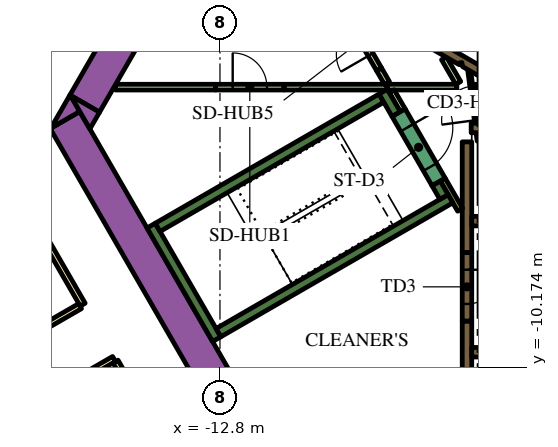
"""IFC4 building model, lengths in metres.
Left out: names, types, materials, properties, quantities, classifications, styles, units other than length and angle.
Written with IfcOpenShell. Run it as: python <this file> out.ifc"""

import sys

from ifc_helpers import new_model, si_unit, direction, frame, frame_2d, origin, place, context, subcontext, project, spatial, polyline, rectangle, outline, extrude, element, fill, save


model = new_model("IFC4")
c1 = context("Model", 3, precision=1e-05, world=origin(), true_north=direction((0.0, 1.0)))
c2 = subcontext(c1, "Body", "Model", "MODEL_VIEW")
j1 = project(units=[si_unit("LENGTHUNIT", "METRE"), si_unit("PLANEANGLEUNIT", "RADIAN")], contexts=[c1])
p1 = place(None, origin())
s1 = spatial("IfcSite", under=j1, at=p1, CompositionType="ELEMENT")
p2 = place(p1, origin())
s2 = spatial("IfcBuilding", under=s1, at=p2, CompositionType="ELEMENT")
p3 = place(p2, frame((0.0, 0.0, 130.5)))
s3 = spatial("IfcBuildingStorey", under=s2, at=p3, CompositionType="ELEMENT", Elevation=130.5)
p4 = place(p3, frame((-12.134, -11.883, 0.0), z_axis=(0.0, 0.0, 1.0), x_axis=(-0.500005339912, 0.866022320763, 0.0)))
e1 = element("IfcWall", 1, at=p4, inside=s3, PredefinedType="SOLIDWALL", context=c2, shape_type="SweptSolid", body=[
    extrude(rectangle(XDim=9.488, YDim=0.9, at=frame_2d((4.744, 0.0))), origin(), (0.0, 0.0, 1.0), 3.9),
])
p5 = place(p3, origin())
e2 = element("IfcWall", 2, at=p5, inside=s3, PredefinedType="SOLIDWALL", context=c2, shape_type="SweptSolid", body=[
    extrude(outline(polyline([(-16.489, -3.44), (-17.251, -3.88), (-16.743, -3.0), (-16.489, -3.44)])), origin(), (0.0, 0.0, 1.0), 3.9),
])
p6 = place(p3, frame((-15.118, -1.085, 0.0), z_axis=(0.0, 0.0, 1.0), x_axis=(-0.50006606081, -0.865987260198, 0.0)))
e3 = element("IfcWall", 3, at=p6, inside=s3, PredefinedType="SOLIDWALL", context=c2, shape_type="SweptSolid", body=[
    extrude(rectangle(XDim=2.481, YDim=0.9, at=frame_2d((1.24, 0.0))), origin(), (0.0, 0.0, 1.0), 3.9),
])
e4 = element("IfcWall", 4, at=p5, inside=s3, PredefinedType="SOLIDWALL", context=c2, shape_type="SweptSolid", body=[
    extrude(outline(polyline([(-16.223, -3.9), (-16.732, -3.02), (-15.969, -3.46), (-16.223, -3.9)])), origin(), (0.0, 0.0, 1.0), 3.9),
])
p7 = place(p3, frame((-12.885, -9.431, 0.0), z_axis=(0.0, 0.0, 1.0), x_axis=(-0.500020560727, 0.866013532718, 0.0)))
e5 = element("IfcWall", 5, at=p7, inside=s3, PredefinedType="SOLIDWALL", context=c2, shape_type="SweptSolid", body=[
    extrude(rectangle(XDim=3.45, YDim=0.25, at=frame_2d((1.725, 0.0))), origin(), (0.0, 0.0, 1.0), 3.9),
])
p8 = place(p3, frame((-14.44, -6.49, 0.0), z_axis=(0.0, 0.0, 1.0), x_axis=(0.866022966069, 0.500004222222, 0.0)))
e6 = element("IfcWall", 6, at=p8, inside=s3, PredefinedType="SOLIDWALL", context=c2, shape_type="SweptSolid", body=[
    extrude(rectangle(XDim=6.8, YDim=0.25, at=frame_2d((3.4, 0.0))), origin(), (0.0, 0.0, 1.0), 3.9),
])
p9 = place(p3, frame((-8.163, -3.511, 0.0), z_axis=(0.0, 0.0, 1.0), x_axis=(-0.500206266495, 0.865906283012, 0.0)))
e7 = element("IfcWall", 7, at=p9, inside=s3, PredefinedType="SOLIDWALL", context=c2, shape_type="SweptSolid", body=[
    extrude(rectangle(XDim=0.684, YDim=0.25, at=frame_2d((0.342, 0.0))), origin(), (0.0, 0.0, 1.0), 3.9),
])
p10 = place(p3, frame((-12.84, -9.261, 0.0), z_axis=(0.0, 0.0, 1.0), x_axis=(0.866016039709, 0.500016218704, 0.0)))
e8 = element("IfcWall", 8, at=p10, inside=s3, PredefinedType="SOLIDWALL", context=c2, shape_type="SweptSolid", body=[
    extrude(rectangle(XDim=7.05, YDim=0.25, at=frame_2d((3.525, 0.0))), origin(), (0.0, 0.0, 1.0), 3.9),
])
p11 = place(p3, frame((-6.905, -5.69, 0.0), z_axis=(0.0, 0.0, 1.0), x_axis=(-0.499993700073, 0.866029041019, 0.0)))
e9 = element("IfcWall", 9, at=p11, inside=s3, PredefinedType="SOLIDWALL", context=c2, shape_type="SweptSolid", body=[
    extrude(rectangle(XDim=0.416, YDim=0.25, at=frame_2d((0.208, 0.0))), origin(), (0.0, 0.0, 1.0), 3.9),
])
p12 = place(p3, frame((-6.3, -12.1, 0.0), z_axis=(0.0, 0.0, 1.0), x_axis=(0.0, 1.0, 0.0)))
e10 = element("IfcWall", 10, at=p12, inside=s3, PredefinedType="SOLIDWALL", context=c2, shape_type="SweptSolid", body=[
    extrude(rectangle(XDim=3.146, YDim=0.25, at=frame_2d((1.573, 0.0))), origin(), (0.0, 0.0, 1.0), 3.9),
])
p13 = place(p3, frame((-6.3, -4.24, 0.0), z_axis=(0.0, 0.0, 1.0), x_axis=(0.0, -1.0, 0.0)))
e11 = element("IfcWall", 11, at=p13, inside=s3, PredefinedType="SOLIDWALL", context=c2, shape_type="SweptSolid", body=[
    extrude(rectangle(XDim=2.914, YDim=0.25, at=frame_2d((1.457, 0.0))), origin(), (0.0, 0.0, 1.0), 3.9),
])
p14 = place(p3, frame((-6.19, -3.875, 0.0), z_axis=(0.0, 0.0, 1.0), x_axis=(1.0, 0.0, 0.0)))
e12 = element("IfcWall", 12, at=p14, inside=s3, PredefinedType="SOLIDWALL", context=c2, shape_type="SweptSolid", body=[
    extrude(rectangle(XDim=12.615, YDim=0.25, at=frame_2d((6.307, 0.0))), origin(), (0.0, 0.0, 1.0), 3.9),
])
e13 = element("IfcWall", 13, at=p5, inside=s3, PredefinedType="SOLIDWALL", context=c2, shape_type="SweptSolid", body=[
    extrude(outline(polyline([(-5.922, -2.257), (-5.922, -2.257), (-5.705, -2.382), (-5.83, -2.598), (-6.418, -2.258), (-6.433, -2.153), (-6.433, -2.153), (-6.433, -2.153), (-6.508, -2.163), (-6.508, -2.163), (-6.508, -2.163), (-6.501, -2.21), (-7.952, -1.373), (-7.827, -1.156), (-5.922, -2.257)])), origin(), (0.0, 0.0, 1.0), 3.9),
])
p15 = place(p3, frame((-6.48, -6.027, 0.0), z_axis=(0.0, 0.0, 1.0), x_axis=(-0.499936960004, 0.866061796884, 0.0)))
e14 = element("IfcWall", 14, at=p15, inside=s3, PredefinedType="PARTITIONING", context=c2, shape_type="SweptSolid", body=[
    extrude(rectangle(XDim=0.919, YDim=0.15, at=frame_2d((0.46, 0.0))), origin(), (0.0, 0.0, 1.0), 3.9),
])
p16 = place(p3, frame((-12.915, -2.8, 0.0), z_axis=(0.0, 0.0, 1.0), x_axis=(-1.0, 0.0, 0.0)))
e15 = element("IfcWall", 15, at=p16, inside=s3, PredefinedType="PARTITIONING", context=c2, shape_type="SweptSolid", body=[
    extrude(rectangle(XDim=2.637, YDim=0.15, at=frame_2d((1.318, 0.0))), origin(), (0.0, 0.0, 1.0), 2.6),
])
p17 = place(p3, frame((-8.395, -2.8, 0.0), z_axis=(0.0, 0.0, 1.0), x_axis=(1.0, 0.0, 0.0)))
e16 = element("IfcWall", 16, at=p17, inside=s3, PredefinedType="PARTITIONING", context=c2, shape_type="SweptSolid", body=[
    extrude(rectangle(XDim=1.828, YDim=0.15, at=frame_2d((0.914, 0.0))), origin(), (0.0, 0.0, 1.0), 2.6),
])
p18 = place(p3, frame((-11.115, -2.8, 0.0), z_axis=(0.0, 0.0, 1.0), x_axis=(1.0, 0.0, 0.0)))
e17 = element("IfcWall", 17, at=p18, inside=s3, PredefinedType="PARTITIONING", context=c2, shape_type="SweptSolid", body=[
    extrude(rectangle(XDim=2.708, YDim=0.15, at=frame_2d((1.354, 0.0))), origin(), (0.0, 0.0, 1.0), 2.6),
])
p19 = place(p3, frame((-6.531, -2.689, 0.0), z_axis=(0.0, 0.0, 1.0), x_axis=(-0.499967446111, 0.866044197965, 0.0)))
e18 = element("IfcWall", 18, at=p19, inside=s3, PredefinedType="PARTITIONING", context=c2, shape_type="SweptSolid", body=[
    extrude(rectangle(XDim=0.748, YDim=0.15, at=frame_2d((0.374, 0.0))), origin(), (0.0, 0.0, 1.0), 2.6),
])
p20 = place(p3, frame((-7.99, -3.412, 0.0), z_axis=(0.0, 0.0, 1.0), x_axis=(-0.500193841991, 0.86591346013, 0.0)))
e19 = element("IfcWall", 19, at=p20, inside=s3, PredefinedType="PARTITIONING", context=c2, shape_type="SweptSolid", body=[
    extrude(rectangle(XDim=0.583, YDim=0.15, at=frame_2d((0.292, 0.0))), origin(), (0.0, 0.0, 1.0), 2.6),
])
p21 = place(p3, frame((-8.612, -2.333, 0.0), z_axis=(0.0, 0.0, 1.0), x_axis=(0.500248216681, -0.86588204838, 0.0)))
e20 = element("IfcWall", 20, at=p21, inside=s3, PredefinedType="PARTITIONING", context=c2, shape_type="SweptSolid", body=[
    extrude(rectangle(XDim=0.415, YDim=0.15, at=frame_2d((0.208, 0.0))), origin(), (0.0, 0.0, 1.0), 2.6),
])
p22 = place(p3, frame((-6.086, -2.801, 0.0), z_axis=(0.0, 0.0, 1.0), x_axis=(1.0, 0.0, 0.0)))
e21 = element("IfcWall", 21, at=p22, inside=s3, PredefinedType="PARTITIONING", context=c2, shape_type="SweptSolid", body=[
    extrude(rectangle(XDim=7.524, YDim=0.15, at=frame_2d((3.762, 0.0))), origin(), (0.0, 0.0, 1.0), 2.6),
])
p23 = place(p3, frame((-6.175, -9.775, 0.0), z_axis=(0.0, 0.0, 1.0), x_axis=(1.0, 0.0, 0.0)))
e22 = element("IfcWall", 22, at=p23, inside=s3, PredefinedType="SOLIDWALL", context=c2, shape_type="SweptSolid", body=[
    extrude(rectangle(XDim=12.35, YDim=0.25, at=frame_2d((6.175, 0.0))), origin(), (0.0, 0.0, 1.0), 3.9),
])
p24 = place(p23, frame((0.585, 0.0, 0.0)))
e23 = element("IfcOpeningElement", 23, at=p24, cuts=e22, PredefinedType="OPENING", context=c2, shape_type="SweptSolid", body=[
    extrude(rectangle(XDim=1.1, YDim=2.1, at=frame_2d((0.55, 1.05))), frame((0.0, 0.135, 0.0), z_axis=(0.0, -1.0, 0.0), x_axis=(1.0, 0.0, 0.0)), (0.0, 0.0, 1.0), 0.27),
])
p25 = place(p23, frame((3.105, 0.0, 0.0)))
e24 = element("IfcOpeningElement", 24, at=p25, cuts=e22, PredefinedType="OPENING", context=c2, shape_type="SweptSolid", body=[
    extrude(rectangle(XDim=1.1, YDim=2.1, at=frame_2d((0.55, 1.05))), frame((0.0, 0.135, 0.0), z_axis=(0.0, -1.0, 0.0), x_axis=(1.0, 0.0, 0.0)), (0.0, 0.0, 1.0), 0.27),
])
p26 = place(p23, frame((5.625, 0.0, 0.0)))
e25 = element("IfcOpeningElement", 25, at=p26, cuts=e22, PredefinedType="OPENING", context=c2, shape_type="SweptSolid", body=[
    extrude(rectangle(XDim=1.1, YDim=2.1, at=frame_2d((0.55, 1.05))), frame((0.0, 0.135, 0.0), z_axis=(0.0, -1.0, 0.0), x_axis=(1.0, 0.0, 0.0)), (0.0, 0.0, 1.0), 0.27),
])
p27 = place(p23, frame((8.145, 0.0, 0.0)))
e26 = element("IfcOpeningElement", 26, at=p27, cuts=e22, PredefinedType="OPENING", context=c2, shape_type="SweptSolid", body=[
    extrude(rectangle(XDim=1.1, YDim=2.1, at=frame_2d((0.55, 1.05))), frame((0.0, 0.135, 0.0), z_axis=(0.0, -1.0, 0.0), x_axis=(1.0, 0.0, 0.0)), (0.0, 0.0, 1.0), 0.27),
])
p28 = place(p23, frame((10.665, 0.0, 0.0)))
e27 = element("IfcOpeningElement", 27, at=p28, cuts=e22, PredefinedType="OPENING", context=c2, shape_type="SweptSolid", body=[
    extrude(rectangle(XDim=1.1, YDim=2.1, at=frame_2d((0.55, 1.05))), frame((0.0, 0.135, 0.0), z_axis=(0.0, -1.0, 0.0), x_axis=(1.0, 0.0, 0.0)), (0.0, 0.0, 1.0), 0.27),
])
p29 = place(p3, frame((-6.175, -6.325, 0.0), z_axis=(0.0, 0.0, 1.0), x_axis=(1.0, 0.0, 0.0)))
e28 = element("IfcWall", 28, at=p29, inside=s3, PredefinedType="SOLIDWALL", context=c2, shape_type="SweptSolid", body=[
    extrude(rectangle(XDim=12.35, YDim=0.25, at=frame_2d((6.175, 0.0))), origin(), (0.0, 0.0, 1.0), 3.9),
])
p30 = place(p29, frame((3.205, 0.0, 0.0)))
e29 = element("IfcOpeningElement", 29, at=p30, cuts=e28, PredefinedType="OPENING", context=c2, shape_type="SweptSolid", body=[
    extrude(rectangle(XDim=0.9, YDim=2.1, at=frame_2d((0.45, 1.05))), frame((0.0, 0.135, 0.0), z_axis=(0.0, -1.0, 0.0), x_axis=(1.0, 0.0, 0.0)), (0.0, 0.0, 1.0), 0.27),
])
p31 = place(p29, frame((8.145, 0.0, 0.0)))
e30 = element("IfcOpeningElement", 30, at=p31, cuts=e28, PredefinedType="OPENING", context=c2, shape_type="SweptSolid", body=[
    extrude(rectangle(XDim=1.1, YDim=2.1, at=frame_2d((0.55, 1.05))), frame((0.0, 0.135, 0.0), z_axis=(0.0, -1.0, 0.0), x_axis=(1.0, 0.0, 0.0)), (0.0, 0.0, 1.0), 0.27),
])
p32 = place(p29, frame((10.665, 0.0, 0.0)))
e31 = element("IfcOpeningElement", 31, at=p32, cuts=e28, PredefinedType="OPENING", context=c2, shape_type="SweptSolid", body=[
    extrude(rectangle(XDim=1.1, YDim=2.1, at=frame_2d((0.55, 1.05))), frame((0.0, 0.135, 0.0), z_axis=(0.0, -1.0, 0.0), x_axis=(1.0, 0.0, 0.0)), (0.0, 0.0, 1.0), 0.27),
])
p33 = place(p3, frame((-8.098, -3.474, 0.0), z_axis=(0.0, 0.0, 1.0), x_axis=(0.49994051562, -0.866059744384, 0.0)))
e32 = element("IfcWall", 32, at=p33, inside=s3, PredefinedType="SOLIDWALL", context=c2, shape_type="SweptSolid", body=[
    extrude(rectangle(XDim=2.1, YDim=0.4, at=frame_2d((1.05, 0.0))), origin(), (0.0, 0.0, 1.0), 3.9),
])
p34 = place(p33, frame((0.45, 0.0, 0.0)))
e33 = element("IfcOpeningElement", 33, at=p34, cuts=e32, PredefinedType="OPENING", context=c2, shape_type="SweptSolid", body=[
    extrude(rectangle(XDim=1.2, YDim=2.1, at=frame_2d((0.6, 1.05))), frame((0.0, 0.21, 0.0), z_axis=(0.0, -1.0, 0.0), x_axis=(1.0, 0.0, 0.0)), (0.0, 0.0, 1.0), 0.42),
])
p35 = place(p3, frame((-6.3, -7.154, 0.0), z_axis=(0.0, 0.0, 1.0), x_axis=(0.0, -1.0, 0.0)))
e34 = element("IfcWall", 34, at=p35, inside=s3, PredefinedType="SOLIDWALL", context=c2, shape_type="SweptSolid", body=[
    extrude(rectangle(XDim=1.8, YDim=0.25, at=frame_2d((0.9, 0.0))), origin(), (0.0, 0.0, 1.0), 3.9),
])
p36 = place(p35, frame((0.45, 0.0, 0.0)))
e35 = element("IfcOpeningElement", 35, at=p36, cuts=e34, PredefinedType="OPENING", context=c2, shape_type="SweptSolid", body=[
    extrude(rectangle(XDim=0.9, YDim=2.1, at=frame_2d((0.45, 1.05))), frame((0.0, 0.135, 0.0), z_axis=(0.0, -1.0, 0.0), x_axis=(1.0, 0.0, 0.0)), (0.0, 0.0, 1.0), 0.27),
])
p37 = place(p3, frame((-5.995, -4.213, 0.0), z_axis=(0.0, 0.0, 1.0), x_axis=(-0.132072335448, 0.991240081014, 0.0)))
e36 = element("IfcWall", 36, at=p37, inside=s3, PredefinedType="PARTITIONING", context=c2, shape_type="SweptSolid", body=[
    extrude(rectangle(XDim=2.1, YDim=0.076, at=frame_2d((1.05, 0.0))), origin(), (0.0, 0.0, 1.0), 2.6),
])
p38 = place(p37, frame((0.55, 0.0, 0.0)))
e37 = element("IfcOpeningElement", 37, at=p38, cuts=e36, PredefinedType="OPENING", context=c2, shape_type="SweptSolid", body=[
    extrude(rectangle(XDim=0.9, YDim=2.1, at=frame_2d((0.45, 1.05))), frame((0.0, 0.048, 0.0), z_axis=(0.0, -1.0, 0.0), x_axis=(1.0, 0.0, 0.0)), (0.0, 0.0, 1.0), 0.096),
])
p39 = place(p3, frame((-12.915, -2.8, 0.0), z_axis=(0.0, 0.0, 1.0), x_axis=(1.0, 0.0, 0.0)))
e38 = element("IfcWall", 38, at=p39, inside=s3, PredefinedType="PARTITIONING", context=c2, shape_type="SweptSolid", body=[
    extrude(rectangle(XDim=1.8, YDim=0.15, at=frame_2d((0.9, 0.0))), origin(), (0.0, 0.0, 1.0), 2.6),
])
p40 = place(p39, frame((0.45, 0.0, 0.0)))
e39 = element("IfcOpeningElement", 39, at=p40, cuts=e38, PredefinedType="OPENING", context=c2, shape_type="SweptSolid", body=[
    extrude(rectangle(XDim=0.9, YDim=2.1, at=frame_2d((0.45, 1.05))), frame((0.0, 0.085, 0.0), z_axis=(0.0, -1.0, 0.0), x_axis=(1.0, 0.0, 0.0)), (0.0, 0.0, 1.0), 0.17),
])
p41 = place(p3, frame((-8.612, -2.333, 0.0), z_axis=(0.0, 0.0, 1.0), x_axis=(-0.499961193289, 0.866047807691, 0.0)))
e40 = element("IfcWall", 40, at=p41, inside=s3, PredefinedType="PARTITIONING", context=c2, shape_type="SweptSolid", body=[
    extrude(rectangle(XDim=1.8, YDim=0.15, at=frame_2d((0.9, 0.0))), origin(), (0.0, 0.0, 1.0), 2.6),
])
p42 = place(p41, frame((0.45, 0.0, 0.0)))
e41 = element("IfcOpeningElement", 41, at=p42, cuts=e40, PredefinedType="OPENING", context=c2, shape_type="SweptSolid", body=[
    extrude(rectangle(XDim=0.9, YDim=2.1, at=frame_2d((0.45, 1.05))), frame((0.0, 0.085, 0.0), z_axis=(0.0, -1.0, 0.0), x_axis=(1.0, 0.0, 0.0)), (0.0, 0.0, 1.0), 0.17),
])
p43 = place(p3, frame((-19.081, -3.9, 0.0), z_axis=(0.0, 0.0, 1.0), x_axis=(0.499998313975, 0.866026377209, 0.0)))
e42 = element("IfcWall", 42, at=p43, inside=s3, PredefinedType="PARTITIONING", context=c2, shape_type="SweptSolid", body=[
    extrude(rectangle(XDim=25.766, YDim=0.15, at=frame_2d((12.883, 0.0))), origin(), (0.0, 0.0, 1.0), 2.6),
])
p44 = place(p43, frame((24.141, 0.0, 0.0)))
e43 = element("IfcOpeningElement", 43, at=p44, cuts=e42, PredefinedType="OPENING", context=c2, shape_type="SweptSolid", body=[
    extrude(rectangle(XDim=1.1, YDim=2.1, at=frame_2d((0.55, 1.05))), frame((0.0, 0.085, 0.0), z_axis=(0.0, -1.0, 0.0), x_axis=(1.0, 0.0, 0.0)), (0.0, 0.0, 1.0), 0.17),
])
p45 = place(p43, frame((13.144, 0.0, 0.0)))
e44 = element("IfcOpeningElement", 44, at=p45, cuts=e42, PredefinedType="OPENING", context=c2, shape_type="SweptSolid", body=[
    extrude(rectangle(XDim=1.0, YDim=2.1, at=frame_2d((0.5, 1.05))), frame((0.0, 0.085, 0.0), z_axis=(0.0, -1.0, 0.0), x_axis=(1.0, 0.0, 0.0)), (0.0, 0.0, 1.0), 0.17),
])
p46 = place(p43, frame((11.593, 0.0, 0.0)))
e45 = element("IfcOpeningElement", 45, at=p46, cuts=e42, PredefinedType="OPENING", context=c2, shape_type="SweptSolid", body=[
    extrude(rectangle(XDim=1.1, YDim=2.1, at=frame_2d((0.55, 1.05))), frame((0.0, 0.085, 0.0), z_axis=(0.0, -1.0, 0.0), x_axis=(1.0, 0.0, 0.0)), (0.0, 0.0, 1.0), 0.17),
])
p47 = place(p43, frame((0.596, 0.0, 0.0)))
e46 = element("IfcOpeningElement", 46, at=p47, cuts=e42, PredefinedType="OPENING", context=c2, shape_type="SweptSolid", body=[
    extrude(rectangle(XDim=1.0, YDim=2.1, at=frame_2d((0.5, 1.05))), frame((0.0, 0.085, 0.0), z_axis=(0.0, -1.0, 0.0), x_axis=(1.0, 0.0, 0.0)), (0.0, 0.0, 1.0), 0.17),
])
p48 = place(p3, frame((-16.412, -8.523, 0.0), z_axis=(0.0, 0.0, 1.0), x_axis=(-0.500001929737, 0.866024289647, 0.0)))
e47 = element("IfcWall", 47, at=p48, inside=s3, PredefinedType="PARTITIONING", context=c2, shape_type="SweptSolid", body=[
    extrude(rectangle(XDim=5.268, YDim=0.15, at=frame_2d((2.634, 0.0))), origin(), (0.0, 0.0, 1.0), 2.6),
])
p49 = place(p48, frame((2.157, 0.0, 0.0)))
e48 = element("IfcOpeningElement", 48, at=p49, cuts=e47, PredefinedType="OPENING", context=c2, shape_type="SweptSolid", body=[
    extrude(rectangle(XDim=1.0, YDim=2.1, at=frame_2d((0.5, 1.05))), frame((0.0, 0.085, 0.0), z_axis=(0.0, -1.0, 0.0), x_axis=(1.0, 0.0, 0.0)), (0.0, 0.0, 1.0), 0.17),
])
p50 = place(p3, frame((-28.211, -15.335, 0.0), z_axis=(0.0, 0.0, 1.0), x_axis=(0.866025884867, 0.49999916674, 0.0)))
e49 = element("IfcWall", 49, at=p50, inside=s3, PredefinedType="PARTITIONING", context=c2, shape_type="SweptSolid", body=[
    extrude(rectangle(XDim=13.543, YDim=0.15, at=frame_2d((6.772, 0.0))), origin(), (0.0, 0.0, 1.0), 2.6),
])
p51 = place(p50, frame((8.488, 0.0, 0.0)))
e50 = element("IfcOpeningElement", 50, at=p51, cuts=e49, PredefinedType="OPENING", context=c2, shape_type="SweptSolid", body=[
    extrude(rectangle(XDim=1.0, YDim=2.1, at=frame_2d((0.5, 1.05))), frame((0.0, 0.085, 0.0), z_axis=(0.0, -1.0, 0.0), x_axis=(1.0, 0.0, 0.0)), (0.0, 0.0, 1.0), 0.17),
])
p52 = place(p3, frame((-15.587, -9.952, 0.0), z_axis=(0.0, 0.0, 1.0), x_axis=(-0.866017869832, -0.500013048961, 0.0)))
e51 = element("IfcWall", 51, at=p52, inside=s3, PredefinedType="PARTITIONING", context=c2, shape_type="SweptSolid", body=[
    extrude(rectangle(XDim=13.624, YDim=0.15, at=frame_2d((6.812, 0.0))), origin(), (0.0, 0.0, 1.0), 2.6),
])
p53 = place(p52, frame((6.334, 0.0, 0.0)))
e52 = element("IfcOpeningElement", 52, at=p53, cuts=e51, PredefinedType="OPENING", context=c2, shape_type="SweptSolid", body=[
    extrude(rectangle(XDim=1.0, YDim=2.1, at=frame_2d((0.5, 1.05))), frame((0.0, 0.085, 0.0), z_axis=(0.0, -1.0, 0.0), x_axis=(1.0, 0.0, 0.0)), (0.0, 0.0, 1.0), 0.17),
])
p54 = place(p3, frame((-12.918, -14.575, 0.0), z_axis=(0.0, 0.0, 1.0), x_axis=(-0.500009150678, 0.866020120573, 0.0)))
e53 = element("IfcWall", 53, at=p54, inside=s3, PredefinedType="PARTITIONING", context=c2, shape_type="SweptSolid", body=[
    extrude(rectangle(XDim=5.258, YDim=0.15, at=frame_2d((2.629, 0.0))), origin(), (0.0, 0.0, 1.0), 2.6),
])
p55 = place(p34, origin())
e54 = element("IfcDoor", 54, at=p55, inside=s3, OperationType="SINGLE_SWING_LEFT", PredefinedType="DOOR", context=c2, shape_type="SweptSolid", body=[
    extrude(rectangle(XDim=1.2, YDim=2.1, at=frame_2d((0.6, 1.05))), frame((0.0, 0.025, 0.0), z_axis=(0.0, -1.0, 0.0), x_axis=(1.0, 0.0, 0.0)), (0.0, 0.0, 1.0), 0.05),
])
fill(e33, e54)
p56 = place(p36, origin())
e55 = element("IfcDoor", 55, at=p56, inside=s3, OperationType="SINGLE_SWING_LEFT", PredefinedType="DOOR", context=c2, shape_type="SweptSolid", body=[
    extrude(rectangle(XDim=0.9, YDim=2.1, at=frame_2d((0.45, 1.05))), frame((0.0, 0.025, 0.0), z_axis=(0.0, -1.0, 0.0), x_axis=(1.0, 0.0, 0.0)), (0.0, 0.0, 1.0), 0.05),
])
fill(e35, e55)
p57 = place(p38, origin())
e56 = element("IfcDoor", 56, at=p57, inside=s3, OperationType="SINGLE_SWING_LEFT", PredefinedType="DOOR", context=c2, shape_type="SweptSolid", body=[
    extrude(rectangle(XDim=0.9, YDim=2.1, at=frame_2d((0.45, 1.05))), frame((0.0, 0.025, 0.0), z_axis=(0.0, -1.0, 0.0), x_axis=(1.0, 0.0, 0.0)), (0.0, 0.0, 1.0), 0.05),
])
fill(e37, e56)
p58 = place(p40, origin())
e57 = element("IfcDoor", 57, at=p58, inside=s3, OperationType="SINGLE_SWING_LEFT", PredefinedType="DOOR", context=c2, shape_type="SweptSolid", body=[
    extrude(rectangle(XDim=0.9, YDim=2.1, at=frame_2d((0.45, 1.05))), frame((0.0, 0.025, 0.0), z_axis=(0.0, -1.0, 0.0), x_axis=(1.0, 0.0, 0.0)), (0.0, 0.0, 1.0), 0.05),
])
fill(e39, e57)
p59 = place(p42, origin())
e58 = element("IfcDoor", 58, at=p59, inside=s3, OperationType="SINGLE_SWING_LEFT", PredefinedType="DOOR", context=c2, shape_type="SweptSolid", body=[
    extrude(rectangle(XDim=0.9, YDim=2.1, at=frame_2d((0.45, 1.05))), frame((0.0, 0.025, 0.0), z_axis=(0.0, -1.0, 0.0), x_axis=(1.0, 0.0, 0.0)), (0.0, 0.0, 1.0), 0.05),
])
fill(e41, e58)
save(model, sys.argv[1])
